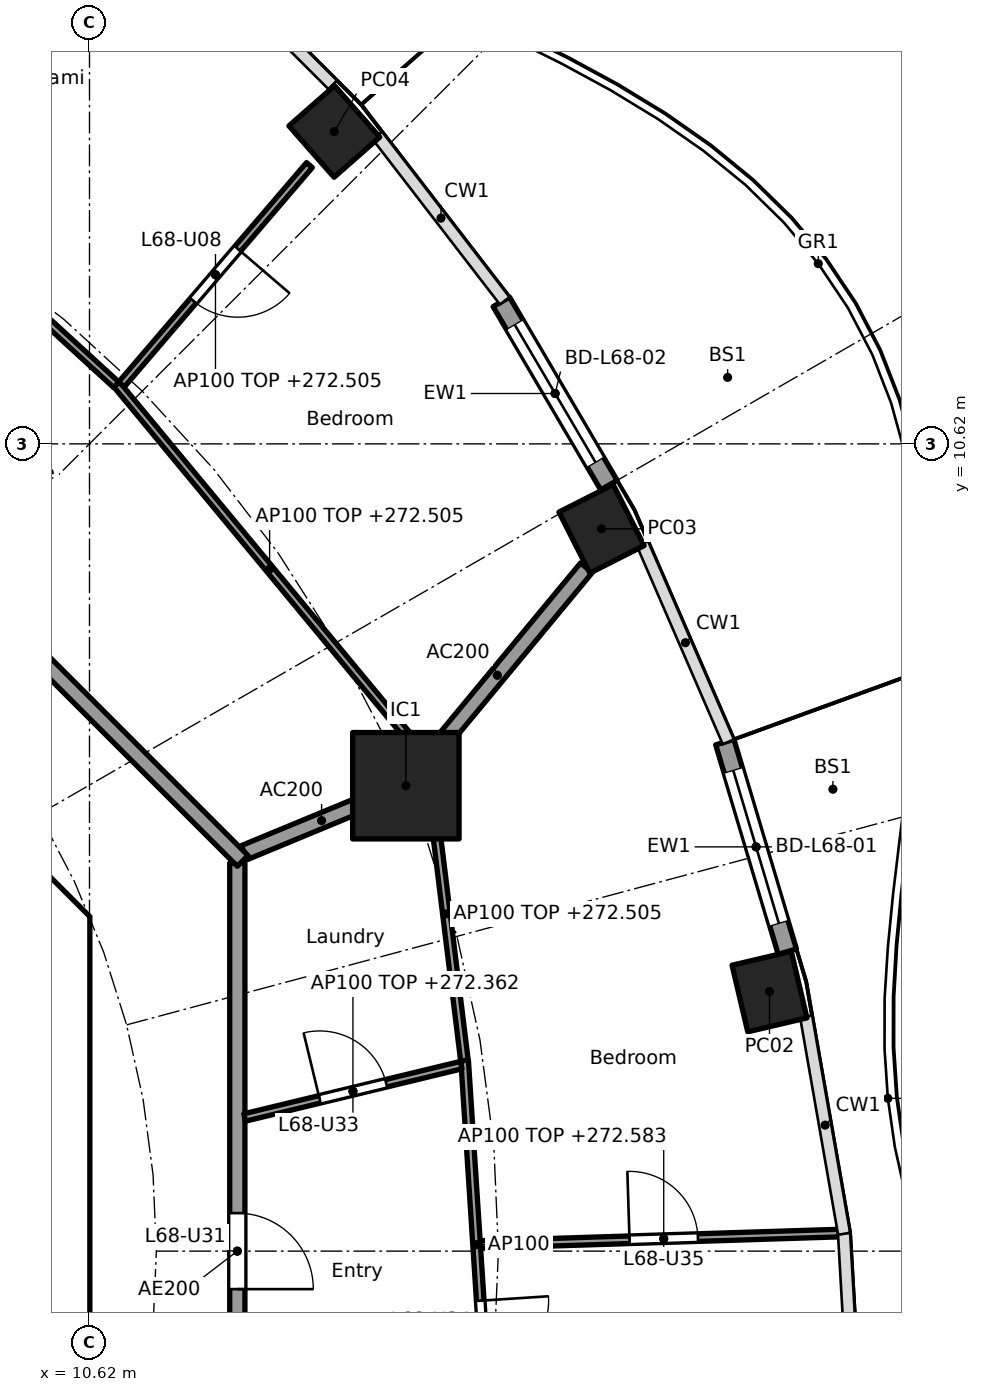
"""IFC4 building model, lengths in metres.
Left out: names, types, materials, properties, quantities, classifications, styles, units other than length and angle.
Written with IfcOpenShell. Run it as: python <this file> out.ifc"""

import sys

from ifc_helpers import new_model, si_unit, direction, frame, frame_2d, origin, origin_2d, place, context, subcontext, project, spatial, polyline, rectangle, hollow_rectangle, outline, extrude, element, fill, save


model = new_model("IFC4")
c1 = context("Model", 3, precision=1e-05, world=origin(), true_north=direction((0.0, 1.0)))
c2 = subcontext(c1, "Body", "Model", "MODEL_VIEW")
j1 = project(units=[si_unit("LENGTHUNIT", "METRE"), si_unit("PLANEANGLEUNIT", "RADIAN")], contexts=[c1])
p1 = place(None, origin())
s1 = spatial("IfcSite", under=j1, at=p1, CompositionType="ELEMENT")
p2 = place(p1, origin())
s2 = spatial("IfcBuilding", under=s1, at=p2, CompositionType="ELEMENT")
p3 = place(p2, frame((0.0, 0.0, 269.6)))
s3 = spatial("IfcBuildingStorey", under=s2, at=p3, CompositionType="ELEMENT", Elevation=269.6)
for number, where, z_axis, x_axis in (
    (1, (19.566, 3.415, 0.0), (0.0, 0.0, 1.0), (-0.229, 0.973, 0.0)),
    (2, (17.356, 9.502, 0.0), (0.0, 0.0, 1.0), (-0.452, 0.892, 0.0)),
    (3, (13.841, 14.73, 0.0), (0.0, 0.0, 1.0), (-0.66, 0.751, 0.0)),
):
    element("IfcColumn", number, at=place(p3, frame(where, z_axis=z_axis, x_axis=x_axis)), inside=s3, PredefinedType="COLUMN", context=c2, shape_type="SweptSolid", body=[
        extrude(hollow_rectangle(XDim=0.9, YDim=0.8, WallThickness=0.028, at=origin_2d()), origin(), (0.0, 0.0, 1.0), 3.7),
    ])
p4 = place(p3, frame((14.782, 6.123, 0.0), z_axis=(0.0, 0.0, 1.0), x_axis=(1.0, 0.0, 0.0)))
e4 = element("IfcColumn", 4, at=p4, inside=s3, PredefinedType="COLUMN", context=c2, shape_type="SweptSolid", body=[
    extrude(rectangle(XDim=1.4, YDim=1.4, at=origin_2d()), origin(), (0.0, 0.0, 1.0), 3.7),
])
p5 = place(p3, frame((18.978, 6.697, 0.0), z_axis=(0.0, 0.0, 1.0), x_axis=(0.285876209024, -0.9582665564, 0.0)))
e5 = element("IfcWall", 5, at=p5, inside=s3, PredefinedType="SOLIDWALL", context=c2, shape_type="SweptSolid", body=[
    extrude(rectangle(XDim=2.877, YDim=0.25, at=frame_2d((1.438, 0.0))), origin(), (0.0, 0.0, 1.0), 3.44),
])
p6 = place(p5, frame((0.389, 0.0, 0.0)))
e6 = element("IfcOpeningElement", 6, at=p6, cuts=e5, PredefinedType="OPENING", context=c2, shape_type="SweptSolid", body=[
    extrude(rectangle(XDim=2.1, YDim=2.4, at=frame_2d((1.05, 1.2))), frame((0.0, 0.135, 0.0), z_axis=(0.0, -1.0, 0.0), x_axis=(1.0, 0.0, 0.0)), (0.0, 0.0, 1.0), 0.27),
])
p7 = place(p3, frame((16.038, 12.489, 0.0), z_axis=(0.0, 0.0, 1.0), x_axis=(0.506371364425, -0.862315511452, 0.0)))
e7 = element("IfcWall", 7, at=p7, inside=s3, PredefinedType="SOLIDWALL", context=c2, shape_type="SweptSolid", body=[
    extrude(rectangle(XDim=2.796, YDim=0.25, at=frame_2d((1.398, 0.0))), origin(), (0.0, 0.0, 1.0), 3.44),
])
p8 = place(p7, frame((0.348, 0.0, 0.0)))
e8 = element("IfcOpeningElement", 8, at=p8, cuts=e7, PredefinedType="OPENING", context=c2, shape_type="SweptSolid", body=[
    extrude(rectangle(XDim=2.1, YDim=2.4, at=frame_2d((1.05, 1.2))), frame((0.0, 0.135, 0.0), z_axis=(0.0, -1.0, 0.0), x_axis=(1.0, 0.0, 0.0)), (0.0, 0.0, 1.0), 0.27),
])
p9 = place(p3, frame((9.988, 4.613, 0.0), z_axis=(0.0, 0.0, 1.0), x_axis=(-0.707106781187, 0.707106781187, 0.0)))
e9 = element("IfcWall", 9, at=p9, inside=s3, PredefinedType="SHEAR", context=c2, shape_type="SweptSolid", body=[
    extrude(rectangle(XDim=7.602, YDim=0.6, at=frame_2d((3.801, 0.0))), origin(), (0.0, 0.0, 1.0), 3.44),
])
p10 = place(p9, frame((3.201, 0.0, 0.0)))
e10 = element("IfcOpeningElement", 10, at=p10, cuts=e9, PredefinedType="OPENING", context=c2, shape_type="SweptSolid", body=[
    extrude(rectangle(XDim=1.2, YDim=2.1, at=frame_2d((0.6, 1.05))), frame((0.0, 0.31, 0.0), z_axis=(0.0, -1.0, 0.0), x_axis=(1.0, 0.0, 0.0)), (0.0, 0.0, 1.0), 0.62),
])
p11 = place(p3, origin())
e11 = element("IfcWall", 11, at=p11, inside=s3, PredefinedType="SHEAR", context=c2, shape_type="SweptSolid", body=[
    extrude(outline(polyline([(9.776, -4.401), (10.025, -4.152), (10.025, -3.801), (10.025, 4.152), (9.776, 4.401), (10.2, 4.825), (10.625, 4.401), (10.625, -4.401), (10.2, -4.825), (9.776, -4.401)])), origin(), (0.0, 0.0, 1.0), 3.44),
])
p12 = place(p3, frame((12.657, 5.243, 0.0), z_axis=(0.0, 0.0, 1.0), x_axis=(0.923853160736, 0.382747093259, 0.0)))
e12 = element("IfcWall", 12, at=p12, inside=s3, PredefinedType="PARTITIONING", context=c2, shape_type="SweptSolid", body=[
    extrude(rectangle(XDim=2.2, YDim=0.2, at=frame_2d((1.1, 0.0))), origin(), (0.0, 0.0, 1.0), 3.44),
])
p13 = place(p3, frame((14.814, 6.161, 0.0), z_axis=(0.0, 0.0, 1.0), x_axis=(0.638050520313, 0.769994502272, 0.0)))
e13 = element("IfcWall", 13, at=p13, inside=s3, PredefinedType="PARTITIONING", context=c2, shape_type="SweptSolid", body=[
    extrude(rectangle(XDim=3.673, YDim=0.2, at=frame_2d((1.836, 0.0))), origin(), (0.0, 0.0, 1.0), 3.44),
])
p14 = place(p3, frame((12.565, -5.104, 0.0), z_axis=(0.0, 0.0, 1.0), x_axis=(0.0, 1.0, 0.0)))
e14 = element("IfcWall", 14, at=p14, inside=s3, PredefinedType="PARTITIONING", context=c2, shape_type="SweptSolid", body=[
    extrude(rectangle(XDim=10.209, YDim=0.2, at=frame_2d((5.104, 0.0))), origin(), (0.0, 0.0, 1.0), 3.44),
])
p15 = place(p14, frame((4.604, 0.0, 0.0)))
e15 = element("IfcOpeningElement", 15, at=p15, cuts=e14, PredefinedType="OPENING", context=c2, shape_type="SweptSolid", body=[
    extrude(rectangle(XDim=1.0, YDim=2.1, at=frame_2d((0.5, 1.05))), frame((0.0, 0.11, 0.0), z_axis=(0.0, -1.0, 0.0), x_axis=(1.0, 0.0, 0.0)), (0.0, 0.0, 1.0), 0.22),
])
p16 = place(p3, frame((12.635, 5.134, 0.0), z_axis=(0.0, 0.0, 1.0), x_axis=(-0.707106781187, 0.707106781187, 0.0)))
e16 = element("IfcWall", 16, at=p16, inside=s3, PredefinedType="PARTITIONING", context=c2, shape_type="SweptSolid", body=[
    extrude(rectangle(XDim=10.609, YDim=0.2, at=frame_2d((5.305, 0.0))), origin(), (0.0, 0.0, 1.0), 3.44),
])
p17 = place(p3, frame((15.87, -2.338, 0.0), z_axis=(0.0, 0.0, 1.0), x_axis=(-0.064797294757, 0.997898447034, 0.0)))
e17 = element("IfcWall", 17, at=p17, inside=s3, PredefinedType="PARTITIONING", context=c2, shape_type="SweptSolid", body=[
    extrude(rectangle(XDim=4.857, YDim=0.1, at=frame_2d((2.428, 0.0))), origin(), (0.0, 0.0, 1.0), 3.44),
])
p18 = place(p17, frame((0.789, 0.0, 0.0)))
e18 = element("IfcOpeningElement", 18, at=p18, cuts=e17, PredefinedType="OPENING", context=c2, shape_type="SweptSolid", body=[
    extrude(rectangle(XDim=0.9, YDim=2.1, at=frame_2d((0.45, 1.05))), frame((0.0, 0.06, 0.0), z_axis=(0.0, -1.0, 0.0), x_axis=(1.0, 0.0, 0.0)), (0.0, 0.0, 1.0), 0.12),
])
p19 = place(p3, frame((15.763, 0.087, 0.0), z_axis=(0.0, 0.0, 1.0), x_axis=(0.999492034598, 0.03186962151, 0.0)))
e19 = element("IfcWall", 19, at=p19, inside=s3, PredefinedType="PARTITIONING", context=c2, shape_type="SweptSolid", body=[
    extrude(rectangle(XDim=4.826, YDim=0.1, at=frame_2d((2.413, 0.0))), origin(), (0.0, 0.0, 1.0), 2.983),
])
p20 = place(p19, frame((1.963, 0.0, 0.0)))
e20 = element("IfcOpeningElement", 20, at=p20, cuts=e19, PredefinedType="OPENING", context=c2, shape_type="SweptSolid", body=[
    extrude(rectangle(XDim=0.9, YDim=2.1, at=frame_2d((0.45, 1.05))), frame((0.0, 0.06, 0.0), z_axis=(0.0, -1.0, 0.0), x_axis=(1.0, 0.0, 0.0)), (0.0, 0.0, 1.0), 0.12),
])
p21 = place(p3, frame((12.662, 1.758, 0.0), z_axis=(0.0, 0.0, 1.0), x_axis=(0.972004827836, 0.234960879007, 0.0)))
e21 = element("IfcWall", 21, at=p21, inside=s3, PredefinedType="PARTITIONING", context=c2, shape_type="SweptSolid", body=[
    extrude(rectangle(XDim=2.93, YDim=0.1, at=frame_2d((1.465, 0.0))), origin(), (0.0, 0.0, 1.0), 2.762),
])
p22 = place(p21, frame((1.015, 0.0, 0.0)))
e22 = element("IfcOpeningElement", 22, at=p22, cuts=e21, PredefinedType="OPENING", context=c2, shape_type="SweptSolid", body=[
    extrude(rectangle(XDim=0.9, YDim=2.1, at=frame_2d((0.45, 1.05))), frame((0.0, 0.06, 0.0), z_axis=(0.0, -1.0, 0.0), x_axis=(1.0, 0.0, 0.0)), (0.0, 0.0, 1.0), 0.12),
])
p23 = place(p3, frame((15.552, 2.508, 0.0), z_axis=(0.0, 0.0, 1.0), x_axis=(-0.12196293976, 0.992534654974, 0.0)))
e23 = element("IfcWall", 23, at=p23, inside=s3, PredefinedType="PARTITIONING", context=c2, shape_type="SweptSolid", body=[
    extrude(rectangle(XDim=3.887, YDim=0.1, at=frame_2d((1.944, 0.0))), origin(), (0.0, 0.0, 1.0), 2.905),
])
p24 = place(p3, frame((15.002, 6.543, 0.0), z_axis=(0.0, 0.0, 1.0), x_axis=(-0.637932656528, 0.770092154054, 0.0)))
e24 = element("IfcWall", 24, at=p24, inside=s3, PredefinedType="PARTITIONING", context=c2, shape_type="SweptSolid", body=[
    extrude(rectangle(XDim=6.311, YDim=0.1, at=frame_2d((3.155, 0.0))), origin(), (0.0, 0.0, 1.0), 2.905),
])
p25 = place(p3, frame((11.041, 11.402, 0.0), z_axis=(0.0, 0.0, 1.0), x_axis=(0.650558544325, 0.759456108282, 0.0)))
e25 = element("IfcWall", 25, at=p25, inside=s3, PredefinedType="PARTITIONING", context=c2, shape_type="SweptSolid", body=[
    extrude(rectangle(XDim=3.8, YDim=0.1, at=frame_2d((1.9, 0.0))), origin(), (0.0, 0.0, 1.0), 2.905),
])
p26 = place(p25, frame((1.45, 0.0, 0.0)))
e26 = element("IfcOpeningElement", 26, at=p26, cuts=e25, PredefinedType="OPENING", context=c2, shape_type="SweptSolid", body=[
    extrude(rectangle(XDim=0.9, YDim=2.1, at=frame_2d((0.45, 1.05))), frame((0.0, 0.06, 0.0), z_axis=(0.0, -1.0, 0.0), x_axis=(1.0, 0.0, 0.0)), (0.0, 0.0, 1.0), 0.12),
])
p27 = place(p3, frame((10.972, 11.398, 0.0), z_axis=(0.0, 0.0, 1.0), x_axis=(-0.737838738013, 0.674977034193, 0.0)))
e27 = element("IfcWall", 27, at=p27, inside=s3, PredefinedType="PARTITIONING", context=c2, shape_type="SweptSolid", body=[
    extrude(rectangle(XDim=5.977, YDim=0.1, at=frame_2d((2.989, 0.0))), origin(), (0.0, 0.0, 1.0), 2.905),
])
p28 = place(p27, frame((2.514, 0.0, 0.0)))
e28 = element("IfcOpeningElement", 28, at=p28, cuts=e27, PredefinedType="OPENING", context=c2, shape_type="SweptSolid", body=[
    extrude(rectangle(XDim=0.9, YDim=2.1, at=frame_2d((0.45, 1.05))), frame((0.0, 0.06, 0.0), z_axis=(0.0, -1.0, 0.0), x_axis=(1.0, 0.0, 0.0)), (0.0, 0.0, 1.0), 0.12),
])
p29 = place(p6, origin())
e29 = element("IfcDoor", 29, at=p29, inside=s3, OperationType="SLIDING_TO_LEFT", PredefinedType="DOOR", context=c2, shape_type="SweptSolid", body=[
    extrude(rectangle(XDim=2.1, YDim=2.4, at=frame_2d((1.05, 1.2))), frame((0.0, 0.025, 0.0), z_axis=(0.0, -1.0, 0.0), x_axis=(1.0, 0.0, 0.0)), (0.0, 0.0, 1.0), 0.05),
])
fill(e6, e29)
p30 = place(p8, origin())
e30 = element("IfcDoor", 30, at=p30, inside=s3, OperationType="SLIDING_TO_LEFT", PredefinedType="DOOR", context=c2, shape_type="SweptSolid", body=[
    extrude(rectangle(XDim=2.1, YDim=2.4, at=frame_2d((1.05, 1.2))), frame((0.0, 0.025, 0.0), z_axis=(0.0, -1.0, 0.0), x_axis=(1.0, 0.0, 0.0)), (0.0, 0.0, 1.0), 0.05),
])
fill(e8, e30)
p31 = place(p26, frame((0.9, 0.0, 0.0), x_axis=(-1.0, 0.0, 0.0)))
e31 = element("IfcDoor", 31, at=p31, inside=s3, OperationType="SINGLE_SWING_LEFT", PredefinedType="DOOR", context=c2, shape_type="SweptSolid", body=[
    extrude(rectangle(XDim=0.9, YDim=2.1, at=frame_2d((0.45, 1.05))), frame((0.0, 0.025, 0.0), z_axis=(0.0, -1.0, 0.0), x_axis=(1.0, 0.0, 0.0)), (0.0, 0.0, 1.0), 0.05),
])
fill(e26, e31)
p32 = place(p15, frame((1.0, 0.0, 0.0), x_axis=(-1.0, 0.0, 0.0)))
e32 = element("IfcDoor", 32, at=p32, inside=s3, OperationType="SINGLE_SWING_RIGHT", PredefinedType="DOOR", context=c2, shape_type="SweptSolid", body=[
    extrude(rectangle(XDim=1.0, YDim=2.1, at=frame_2d((0.5, 1.05))), frame((0.0, 0.025, 0.0), z_axis=(0.0, -1.0, 0.0), x_axis=(1.0, 0.0, 0.0)), (0.0, 0.0, 1.0), 0.05),
])
fill(e15, e32)
p33 = place(p22, origin())
e33 = element("IfcDoor", 33, at=p33, inside=s3, OperationType="SINGLE_SWING_LEFT", PredefinedType="DOOR", context=c2, shape_type="SweptSolid", body=[
    extrude(rectangle(XDim=0.9, YDim=2.1, at=frame_2d((0.45, 1.05))), frame((0.0, 0.025, 0.0), z_axis=(0.0, -1.0, 0.0), x_axis=(1.0, 0.0, 0.0)), (0.0, 0.0, 1.0), 0.05),
])
fill(e22, e33)
p34 = place(p18, frame((0.9, 0.0, 0.0), x_axis=(-1.0, 0.0, 0.0)))
e34 = element("IfcDoor", 34, at=p34, inside=s3, OperationType="SINGLE_SWING_LEFT", PredefinedType="DOOR", context=c2, shape_type="SweptSolid", body=[
    extrude(rectangle(XDim=0.9, YDim=2.1, at=frame_2d((0.45, 1.05))), frame((0.0, 0.025, 0.0), z_axis=(0.0, -1.0, 0.0), x_axis=(1.0, 0.0, 0.0)), (0.0, 0.0, 1.0), 0.05),
])
fill(e18, e34)
p35 = place(p20, origin())
e35 = element("IfcDoor", 35, at=p35, inside=s3, OperationType="SINGLE_SWING_LEFT", PredefinedType="DOOR", context=c2, shape_type="SweptSolid", body=[
    extrude(rectangle(XDim=0.9, YDim=2.1, at=frame_2d((0.45, 1.05))), frame((0.0, 0.025, 0.0), z_axis=(0.0, -1.0, 0.0), x_axis=(1.0, 0.0, 0.0)), (0.0, 0.0, 1.0), 0.05),
])
fill(e20, e35)
save(model, sys.argv[1])
